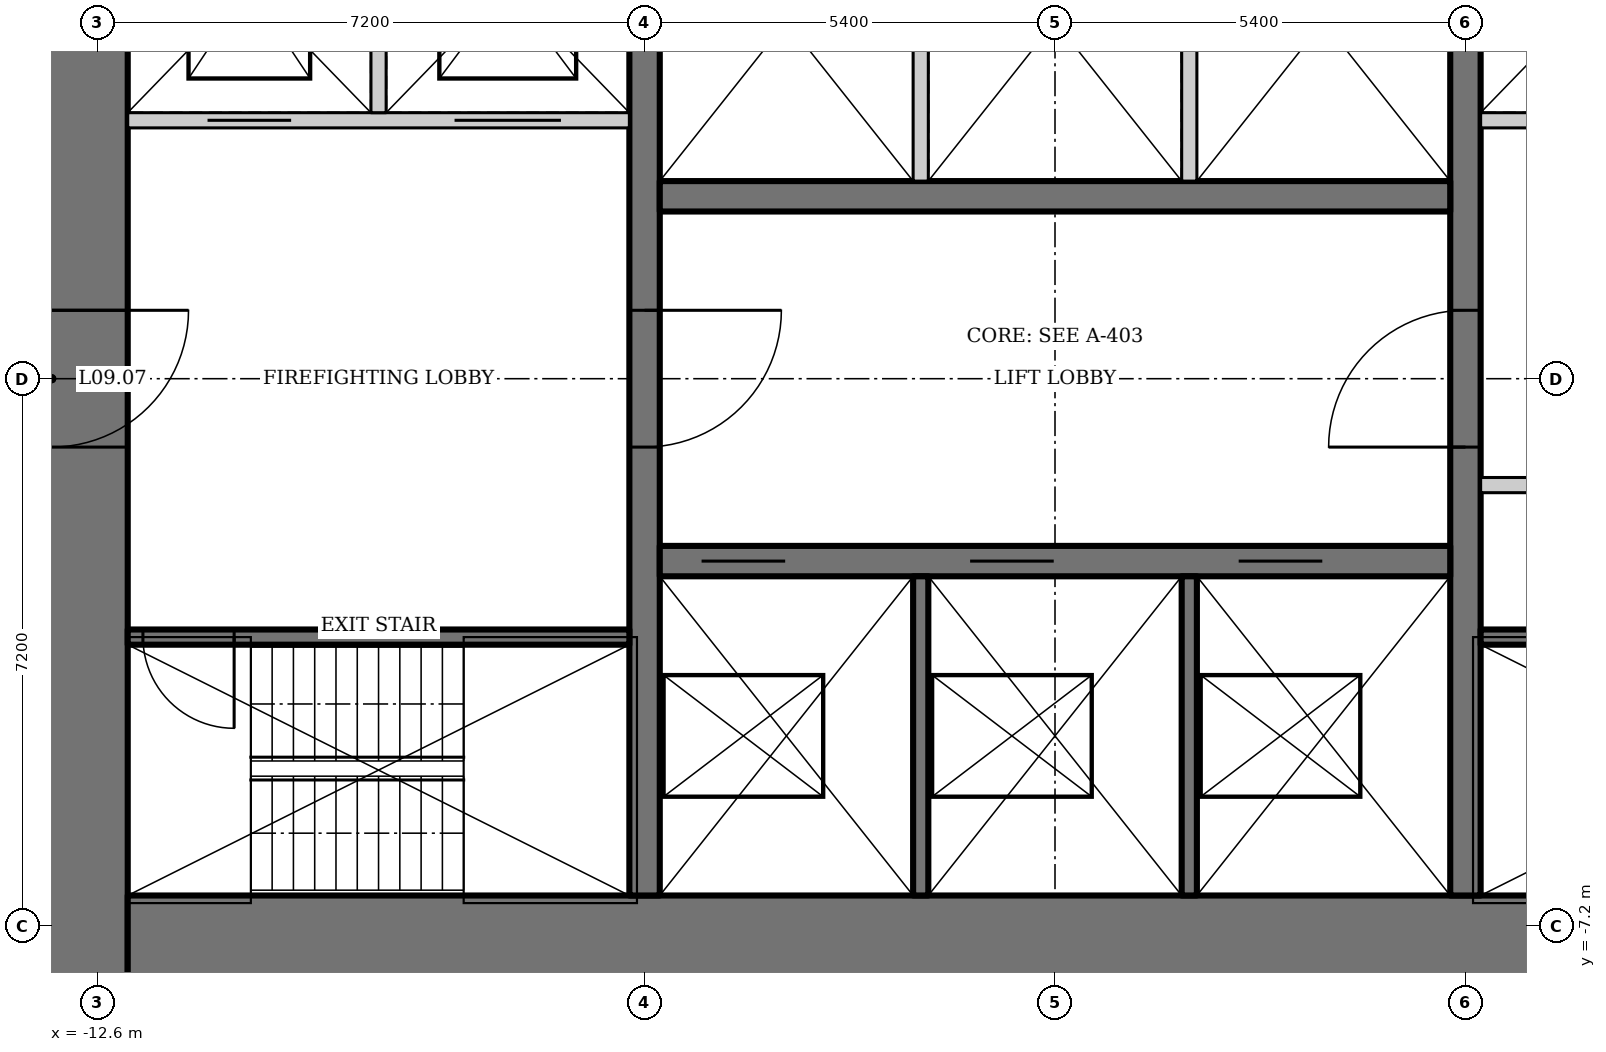
"""IFC4 building model, lengths in metres.
Left out: names, types, materials, properties, quantities, classifications, styles, units other than length and angle.
Written with IfcOpenShell. Run it as: python <this file> out.ifc"""

import sys

from ifc_helpers import new_model, si_unit, direction, frame, frame_2d, origin, place, context, subcontext, project, spatial, rectangle, extrude, element, fill, save


model = new_model("IFC4")
c1 = context("Model", 3, precision=1e-05, world=origin(), true_north=direction((0.0, 1.0)))
c2 = subcontext(c1, "Body", "Model", "MODEL_VIEW")
j1 = project(units=[si_unit("LENGTHUNIT", "METRE"), si_unit("PLANEANGLEUNIT", "RADIAN")], contexts=[c1])
p1 = place(None, origin())
s1 = spatial("IfcSite", under=j1, at=p1, CompositionType="ELEMENT")
p2 = place(p1, origin())
s2 = spatial("IfcBuilding", under=s1, at=p2, CompositionType="ELEMENT")
p3 = place(p2, frame((0.0, 0.0, 47.8)))
s3 = spatial("IfcBuildingStorey", under=s2, at=p3, CompositionType="ELEMENT", Elevation=47.8)
p4 = place(p3, frame((-13.2, 13.0, 0.0), z_axis=(0.0, 0.0, 1.0), x_axis=(0.0, -1.0, 0.0)))
e1 = element("IfcWall", 1, at=p4, inside=s3, PredefinedType="SHEAR", context=c2, shape_type="SweptSolid", body=[
    extrude(rectangle(XDim=26.0, YDim=2.0, at=frame_2d((13.0, 0.0))), origin(), (0.0, 0.0, 1.0), 3.6),
])
p5 = place(p4, frame((12.1, 0.0, 0.0)))
e2 = element("IfcOpeningElement", 2, at=p5, cuts=e1, PredefinedType="OPENING", context=c2, shape_type="SweptSolid", body=[
    extrude(rectangle(XDim=1.8, YDim=2.1, at=frame_2d((0.9, 1.05))), frame((0.0, 1.01, 0.0), z_axis=(0.0, -1.0, 0.0), x_axis=(1.0, 0.0, 0.0)), (0.0, 0.0, 1.0), 2.02),
])
p6 = place(p3, frame((-12.2, -8.0, 0.0), z_axis=(0.0, 0.0, 1.0), x_axis=(1.0, 0.0, 0.0)))
e3 = element("IfcWall", 3, at=p6, inside=s3, PredefinedType="SHEAR", context=c2, shape_type="SweptSolid", body=[
    extrude(rectangle(XDim=24.4, YDim=2.4, at=frame_2d((12.2, 0.0))), origin(), (0.0, 0.0, 1.0), 3.6),
])
p7 = place(p3, frame((5.4, -6.8, 0.0), z_axis=(0.0, 0.0, 1.0), x_axis=(0.0, 1.0, 0.0)))
e4 = element("IfcWall", 4, at=p7, inside=s3, PredefinedType="SHEAR", context=c2, shape_type="SweptSolid", body=[
    extrude(rectangle(XDim=13.6, YDim=0.4, at=frame_2d((6.8, 0.0))), origin(), (0.0, 0.0, 1.0), 3.6),
])
p8 = place(p7, frame((5.9, 0.0, 0.0)))
e5 = element("IfcOpeningElement", 5, at=p8, cuts=e4, PredefinedType="OPENING", context=c2, shape_type="SweptSolid", body=[
    extrude(rectangle(XDim=1.8, YDim=2.1, at=frame_2d((0.9, 1.05))), frame((0.0, 0.21, 0.0), z_axis=(0.0, -1.0, 0.0), x_axis=(1.0, 0.0, 0.0)), (0.0, 0.0, 1.0), 0.42),
])
p9 = place(p3, frame((-5.4, 6.8, 0.0), z_axis=(0.0, 0.0, 1.0), x_axis=(0.0, -1.0, 0.0)))
e6 = element("IfcWall", 6, at=p9, inside=s3, PredefinedType="SHEAR", context=c2, shape_type="SweptSolid", body=[
    extrude(rectangle(XDim=13.6, YDim=0.4, at=frame_2d((6.8, 0.0))), origin(), (0.0, 0.0, 1.0), 3.6),
])
p10 = place(p9, frame((5.9, 0.0, 0.0)))
e7 = element("IfcOpeningElement", 7, at=p10, cuts=e6, PredefinedType="OPENING", context=c2, shape_type="SweptSolid", body=[
    extrude(rectangle(XDim=1.8, YDim=2.1, at=frame_2d((0.9, 1.05))), frame((0.0, 0.21, 0.0), z_axis=(0.0, -1.0, 0.0), x_axis=(1.0, 0.0, 0.0)), (0.0, 0.0, 1.0), 0.42),
])
p11 = place(p3, frame((-5.2, -2.4, 0.0), z_axis=(0.0, 0.0, 1.0), x_axis=(1.0, 0.0, 0.0)))
e8 = element("IfcWall", 8, at=p11, inside=s3, PredefinedType="SHEAR", context=c2, shape_type="SweptSolid", body=[
    extrude(rectangle(XDim=10.4, YDim=0.4, at=frame_2d((5.2, 0.0))), origin(), (0.0, 0.0, 1.0), 3.6),
])
p12 = place(p11, frame((0.55, 0.0, 0.0)))
e9 = element("IfcOpeningElement", 9, at=p12, cuts=e8, PredefinedType="OPENING", context=c2, shape_type="SweptSolid", body=[
    extrude(rectangle(XDim=1.1, YDim=2.2, at=frame_2d((0.55, 1.1))), frame((0.0, 0.21, 0.0), z_axis=(0.0, -1.0, 0.0), x_axis=(1.0, 0.0, 0.0)), (0.0, 0.0, 1.0), 0.42),
])
p13 = place(p11, frame((4.083, 0.0, 0.0)))
e10 = element("IfcOpeningElement", 10, at=p13, cuts=e8, PredefinedType="OPENING", context=c2, shape_type="SweptSolid", body=[
    extrude(rectangle(XDim=1.1, YDim=2.2, at=frame_2d((0.55, 1.1))), frame((0.0, 0.21, 0.0), z_axis=(0.0, -1.0, 0.0), x_axis=(1.0, 0.0, 0.0)), (0.0, 0.0, 1.0), 0.42),
])
p14 = place(p11, frame((7.617, 0.0, 0.0)))
e11 = element("IfcOpeningElement", 11, at=p14, cuts=e8, PredefinedType="OPENING", context=c2, shape_type="SweptSolid", body=[
    extrude(rectangle(XDim=1.1, YDim=2.2, at=frame_2d((0.55, 1.1))), frame((0.0, 0.21, 0.0), z_axis=(0.0, -1.0, 0.0), x_axis=(1.0, 0.0, 0.0)), (0.0, 0.0, 1.0), 0.42),
])
for number, where, z_axis, x_axis in (
    (12, (-1.767, -2.6, 0.0), (0.0, 0.0, 1.0), (0.0, -1.0, 0.0)),
    (13, (1.767, -2.6, 0.0), (0.0, 0.0, 1.0), (0.0, -1.0, 0.0)),
):
    element("IfcWall", number, at=place(p3, frame(where, z_axis=z_axis, x_axis=x_axis)), inside=s3, PredefinedType="SOLIDWALL", context=c2, shape_type="SweptSolid", body=[
        extrude(rectangle(XDim=4.2, YDim=0.2, at=frame_2d((2.1, 0.0))), origin(), (0.0, 0.0, 1.0), 3.6),
    ])
p15 = place(p3, frame((5.2, 2.4, 0.0), z_axis=(0.0, 0.0, 1.0), x_axis=(-1.0, 0.0, 0.0)))
e14 = element("IfcWall", 14, at=p15, inside=s3, PredefinedType="SHEAR", context=c2, shape_type="SweptSolid", body=[
    extrude(rectangle(XDim=10.4, YDim=0.4, at=frame_2d((5.2, 0.0))), origin(), (0.0, 0.0, 1.0), 3.6),
])
for number, where, z_axis, x_axis in (
    (15, (-1.767, 2.6, 0.0), (0.0, 0.0, 1.0), (0.0, 1.0, 0.0)),
    (16, (1.767, 2.6, 0.0), (0.0, 0.0, 1.0), (0.0, 1.0, 0.0)),
):
    element("IfcWall", number, at=place(p3, frame(where, z_axis=z_axis, x_axis=x_axis)), inside=s3, PredefinedType="SOLIDWALL", context=c2, shape_type="SweptSolid", body=[
        extrude(rectangle(XDim=4.2, YDim=0.2, at=frame_2d((2.1, 0.0))), origin(), (0.0, 0.0, 1.0), 3.6),
    ])
p16 = place(p3, frame((5.6, -3.4, 0.0), z_axis=(0.0, 0.0, 1.0), x_axis=(1.0, 0.0, 0.0)))
e17 = element("IfcWall", 17, at=p16, inside=s3, PredefinedType="SHEAR", context=c2, shape_type="SweptSolid", body=[
    extrude(rectangle(XDim=6.6, YDim=0.2, at=frame_2d((3.3, 0.0))), origin(), (0.0, 0.0, 1.0), 3.6),
])
p17 = place(p16, frame((5.2, 0.0, 0.0)))
e18 = element("IfcOpeningElement", 18, at=p17, cuts=e17, PredefinedType="OPENING", context=c2, shape_type="SweptSolid", body=[
    extrude(rectangle(XDim=1.2, YDim=2.1, at=frame_2d((0.6, 1.05))), frame((0.0, 0.11, 0.0), z_axis=(0.0, -1.0, 0.0), x_axis=(1.0, 0.0, 0.0)), (0.0, 0.0, 1.0), 0.22),
])
p18 = place(p3, frame((12.2, 3.4, 0.0), z_axis=(0.0, 0.0, 1.0), x_axis=(-1.0, 0.0, 0.0)))
e19 = element("IfcWall", 19, at=p18, inside=s3, PredefinedType="SOLIDWALL", context=c2, shape_type="SweptSolid", body=[
    extrude(rectangle(XDim=6.6, YDim=0.2, at=frame_2d((3.3, 0.0))), origin(), (0.0, 0.0, 1.0), 3.6),
])
p19 = place(p18, frame((4.45, 0.0, 0.0)))
e20 = element("IfcOpeningElement", 20, at=p19, cuts=e19, PredefinedType="OPENING", context=c2, shape_type="SweptSolid", body=[
    extrude(rectangle(XDim=1.1, YDim=2.2, at=frame_2d((0.55, 1.1))), frame((0.0, 0.11, 0.0), z_axis=(0.0, -1.0, 0.0), x_axis=(1.0, 0.0, 0.0)), (0.0, 0.0, 1.0), 0.22),
])
p20 = place(p18, frame((0.9, 0.0, 0.0)))
e21 = element("IfcOpeningElement", 21, at=p20, cuts=e19, PredefinedType="OPENING", context=c2, shape_type="SweptSolid", body=[
    extrude(rectangle(XDim=1.4, YDim=2.2, at=frame_2d((0.7, 1.1))), frame((0.0, 0.11, 0.0), z_axis=(0.0, -1.0, 0.0), x_axis=(1.0, 0.0, 0.0)), (0.0, 0.0, 1.0), 0.22),
])
p21 = place(p3, frame((-5.6, -3.4, 0.0), z_axis=(0.0, 0.0, 1.0), x_axis=(-1.0, 0.0, 0.0)))
e22 = element("IfcWall", 22, at=p21, inside=s3, PredefinedType="SHEAR", context=c2, shape_type="SweptSolid", body=[
    extrude(rectangle(XDim=6.6, YDim=0.2, at=frame_2d((3.3, 0.0))), origin(), (0.0, 0.0, 1.0), 3.6),
])
p22 = place(p21, frame((5.2, 0.0, 0.0)))
e23 = element("IfcOpeningElement", 23, at=p22, cuts=e22, PredefinedType="OPENING", context=c2, shape_type="SweptSolid", body=[
    extrude(rectangle(XDim=1.2, YDim=2.1, at=frame_2d((0.6, 1.05))), frame((0.0, 0.11, 0.0), z_axis=(0.0, -1.0, 0.0), x_axis=(1.0, 0.0, 0.0)), (0.0, 0.0, 1.0), 0.22),
])
p23 = place(p3, frame((-12.2, 3.4, 0.0), z_axis=(0.0, 0.0, 1.0), x_axis=(1.0, 0.0, 0.0)))
e24 = element("IfcWall", 24, at=p23, inside=s3, PredefinedType="SOLIDWALL", context=c2, shape_type="SweptSolid", body=[
    extrude(rectangle(XDim=6.6, YDim=0.2, at=frame_2d((3.3, 0.0))), origin(), (0.0, 0.0, 1.0), 3.6),
])
p24 = place(p23, frame((1.05, 0.0, 0.0)))
e25 = element("IfcOpeningElement", 25, at=p24, cuts=e24, PredefinedType="OPENING", context=c2, shape_type="SweptSolid", body=[
    extrude(rectangle(XDim=1.1, YDim=2.2, at=frame_2d((0.55, 1.1))), frame((0.0, 0.11, 0.0), z_axis=(0.0, -1.0, 0.0), x_axis=(1.0, 0.0, 0.0)), (0.0, 0.0, 1.0), 0.22),
])
p25 = place(p23, frame((4.3, 0.0, 0.0)))
e26 = element("IfcOpeningElement", 26, at=p25, cuts=e24, PredefinedType="OPENING", context=c2, shape_type="SweptSolid", body=[
    extrude(rectangle(XDim=1.4, YDim=2.2, at=frame_2d((0.7, 1.1))), frame((0.0, 0.11, 0.0), z_axis=(0.0, -1.0, 0.0), x_axis=(1.0, 0.0, 0.0)), (0.0, 0.0, 1.0), 0.22),
])
p26 = place(p3, frame((-8.9, 3.5, 0.0), z_axis=(0.0, 0.0, 1.0), x_axis=(0.0, 1.0, 0.0)))
e27 = element("IfcWall", 27, at=p26, inside=s3, PredefinedType="SOLIDWALL", context=c2, shape_type="SweptSolid", body=[
    extrude(rectangle(XDim=3.3, YDim=0.2, at=frame_2d((1.65, 0.0))), origin(), (0.0, 0.0, 1.0), 3.6),
])
p27 = place(p3, frame((5.6, -1.4, 0.0), z_axis=(0.0, 0.0, 1.0), x_axis=(1.0, 0.0, 0.0)))
e28 = element("IfcWall", 28, at=p27, inside=s3, PredefinedType="SOLIDWALL", context=c2, shape_type="SweptSolid", body=[
    extrude(rectangle(XDim=3.0, YDim=0.2, at=frame_2d((1.5, 0.0))), origin(), (0.0, 0.0, 1.0), 3.45),
])
p28 = place(p27, frame((1.05, 0.0, 0.0)))
e29 = element("IfcOpeningElement", 29, at=p28, cuts=e28, PredefinedType="OPENING", context=c2, shape_type="SweptSolid", body=[
    extrude(rectangle(XDim=0.9, YDim=2.1, at=frame_2d((0.45, 1.05))), frame((0.0, 0.11, 0.0), z_axis=(0.0, -1.0, 0.0), x_axis=(1.0, 0.0, 0.0)), (0.0, 0.0, 1.0), 0.22),
])
p29 = place(p8, origin())
e30 = element("IfcDoor", 30, at=p29, inside=s3, OperationType="DOUBLE_DOOR_DOUBLE_SWING", PredefinedType="DOOR", context=c2, shape_type="SweptSolid", body=[
    extrude(rectangle(XDim=1.8, YDim=2.1, at=frame_2d((0.9, 1.05))), frame((0.0, 0.025, 0.0), z_axis=(0.0, -1.0, 0.0), x_axis=(1.0, 0.0, 0.0)), (0.0, 0.0, 1.0), 0.05),
])
fill(e5, e30)
p30 = place(p10, origin())
e31 = element("IfcDoor", 31, at=p30, inside=s3, OperationType="DOUBLE_DOOR_DOUBLE_SWING", PredefinedType="DOOR", context=c2, shape_type="SweptSolid", body=[
    extrude(rectangle(XDim=1.8, YDim=2.1, at=frame_2d((0.9, 1.05))), frame((0.0, 0.025, 0.0), z_axis=(0.0, -1.0, 0.0), x_axis=(1.0, 0.0, 0.0)), (0.0, 0.0, 1.0), 0.05),
])
fill(e7, e31)
p31 = place(p22, origin())
e32 = element("IfcDoor", 32, at=p31, inside=s3, OperationType="SINGLE_SWING_RIGHT", PredefinedType="DOOR", context=c2, shape_type="SweptSolid", body=[
    extrude(rectangle(XDim=1.2, YDim=2.1, at=frame_2d((0.6, 1.05))), frame((0.0, 0.025, 0.0), z_axis=(0.0, -1.0, 0.0), x_axis=(1.0, 0.0, 0.0)), (0.0, 0.0, 1.0), 0.05),
])
fill(e23, e32)
p32 = place(p5, origin())
e33 = element("IfcDoor", 33, at=p32, inside=s3, OperationType="DOUBLE_DOOR_DOUBLE_SWING", PredefinedType="DOOR", context=c2, shape_type="SweptSolid", body=[
    extrude(rectangle(XDim=1.8, YDim=2.1, at=frame_2d((0.9, 1.05))), frame((0.0, 0.025, 0.0), z_axis=(0.0, -1.0, 0.0), x_axis=(1.0, 0.0, 0.0)), (0.0, 0.0, 1.0), 0.05),
])
fill(e2, e33)
p33 = place(p12, origin())
e34 = element("IfcDoor", 34, at=p33, inside=s3, OperationType="DOUBLE_DOOR_SLIDING", PredefinedType="DOOR", context=c2, shape_type="SweptSolid", body=[
    extrude(rectangle(XDim=1.1, YDim=2.2, at=frame_2d((0.55, 1.1))), frame((0.0, 0.025, 0.0), z_axis=(0.0, -1.0, 0.0), x_axis=(1.0, 0.0, 0.0)), (0.0, 0.0, 1.0), 0.05),
])
fill(e9, e34)
p34 = place(p13, origin())
e35 = element("IfcDoor", 35, at=p34, inside=s3, OperationType="DOUBLE_DOOR_SLIDING", PredefinedType="DOOR", context=c2, shape_type="SweptSolid", body=[
    extrude(rectangle(XDim=1.1, YDim=2.2, at=frame_2d((0.55, 1.1))), frame((0.0, 0.025, 0.0), z_axis=(0.0, -1.0, 0.0), x_axis=(1.0, 0.0, 0.0)), (0.0, 0.0, 1.0), 0.05),
])
fill(e10, e35)
p35 = place(p14, origin())
e36 = element("IfcDoor", 36, at=p35, inside=s3, OperationType="DOUBLE_DOOR_SLIDING", PredefinedType="DOOR", context=c2, shape_type="SweptSolid", body=[
    extrude(rectangle(XDim=1.1, YDim=2.2, at=frame_2d((0.55, 1.1))), frame((0.0, 0.025, 0.0), z_axis=(0.0, -1.0, 0.0), x_axis=(1.0, 0.0, 0.0)), (0.0, 0.0, 1.0), 0.05),
])
fill(e11, e36)
p36 = place(p24, origin())
e37 = element("IfcDoor", 37, at=p36, inside=s3, OperationType="DOUBLE_DOOR_SLIDING", PredefinedType="DOOR", context=c2, shape_type="SweptSolid", body=[
    extrude(rectangle(XDim=1.1, YDim=2.2, at=frame_2d((0.55, 1.1))), frame((0.0, 0.025, 0.0), z_axis=(0.0, -1.0, 0.0), x_axis=(1.0, 0.0, 0.0)), (0.0, 0.0, 1.0), 0.05),
])
fill(e25, e37)
p37 = place(p25, origin())
e38 = element("IfcDoor", 38, at=p37, inside=s3, OperationType="DOUBLE_DOOR_SLIDING", PredefinedType="DOOR", context=c2, shape_type="SweptSolid", body=[
    extrude(rectangle(XDim=1.4, YDim=2.2, at=frame_2d((0.7, 1.1))), frame((0.0, 0.025, 0.0), z_axis=(0.0, -1.0, 0.0), x_axis=(1.0, 0.0, 0.0)), (0.0, 0.0, 1.0), 0.05),
])
fill(e26, e38)
save(model, sys.argv[1])
